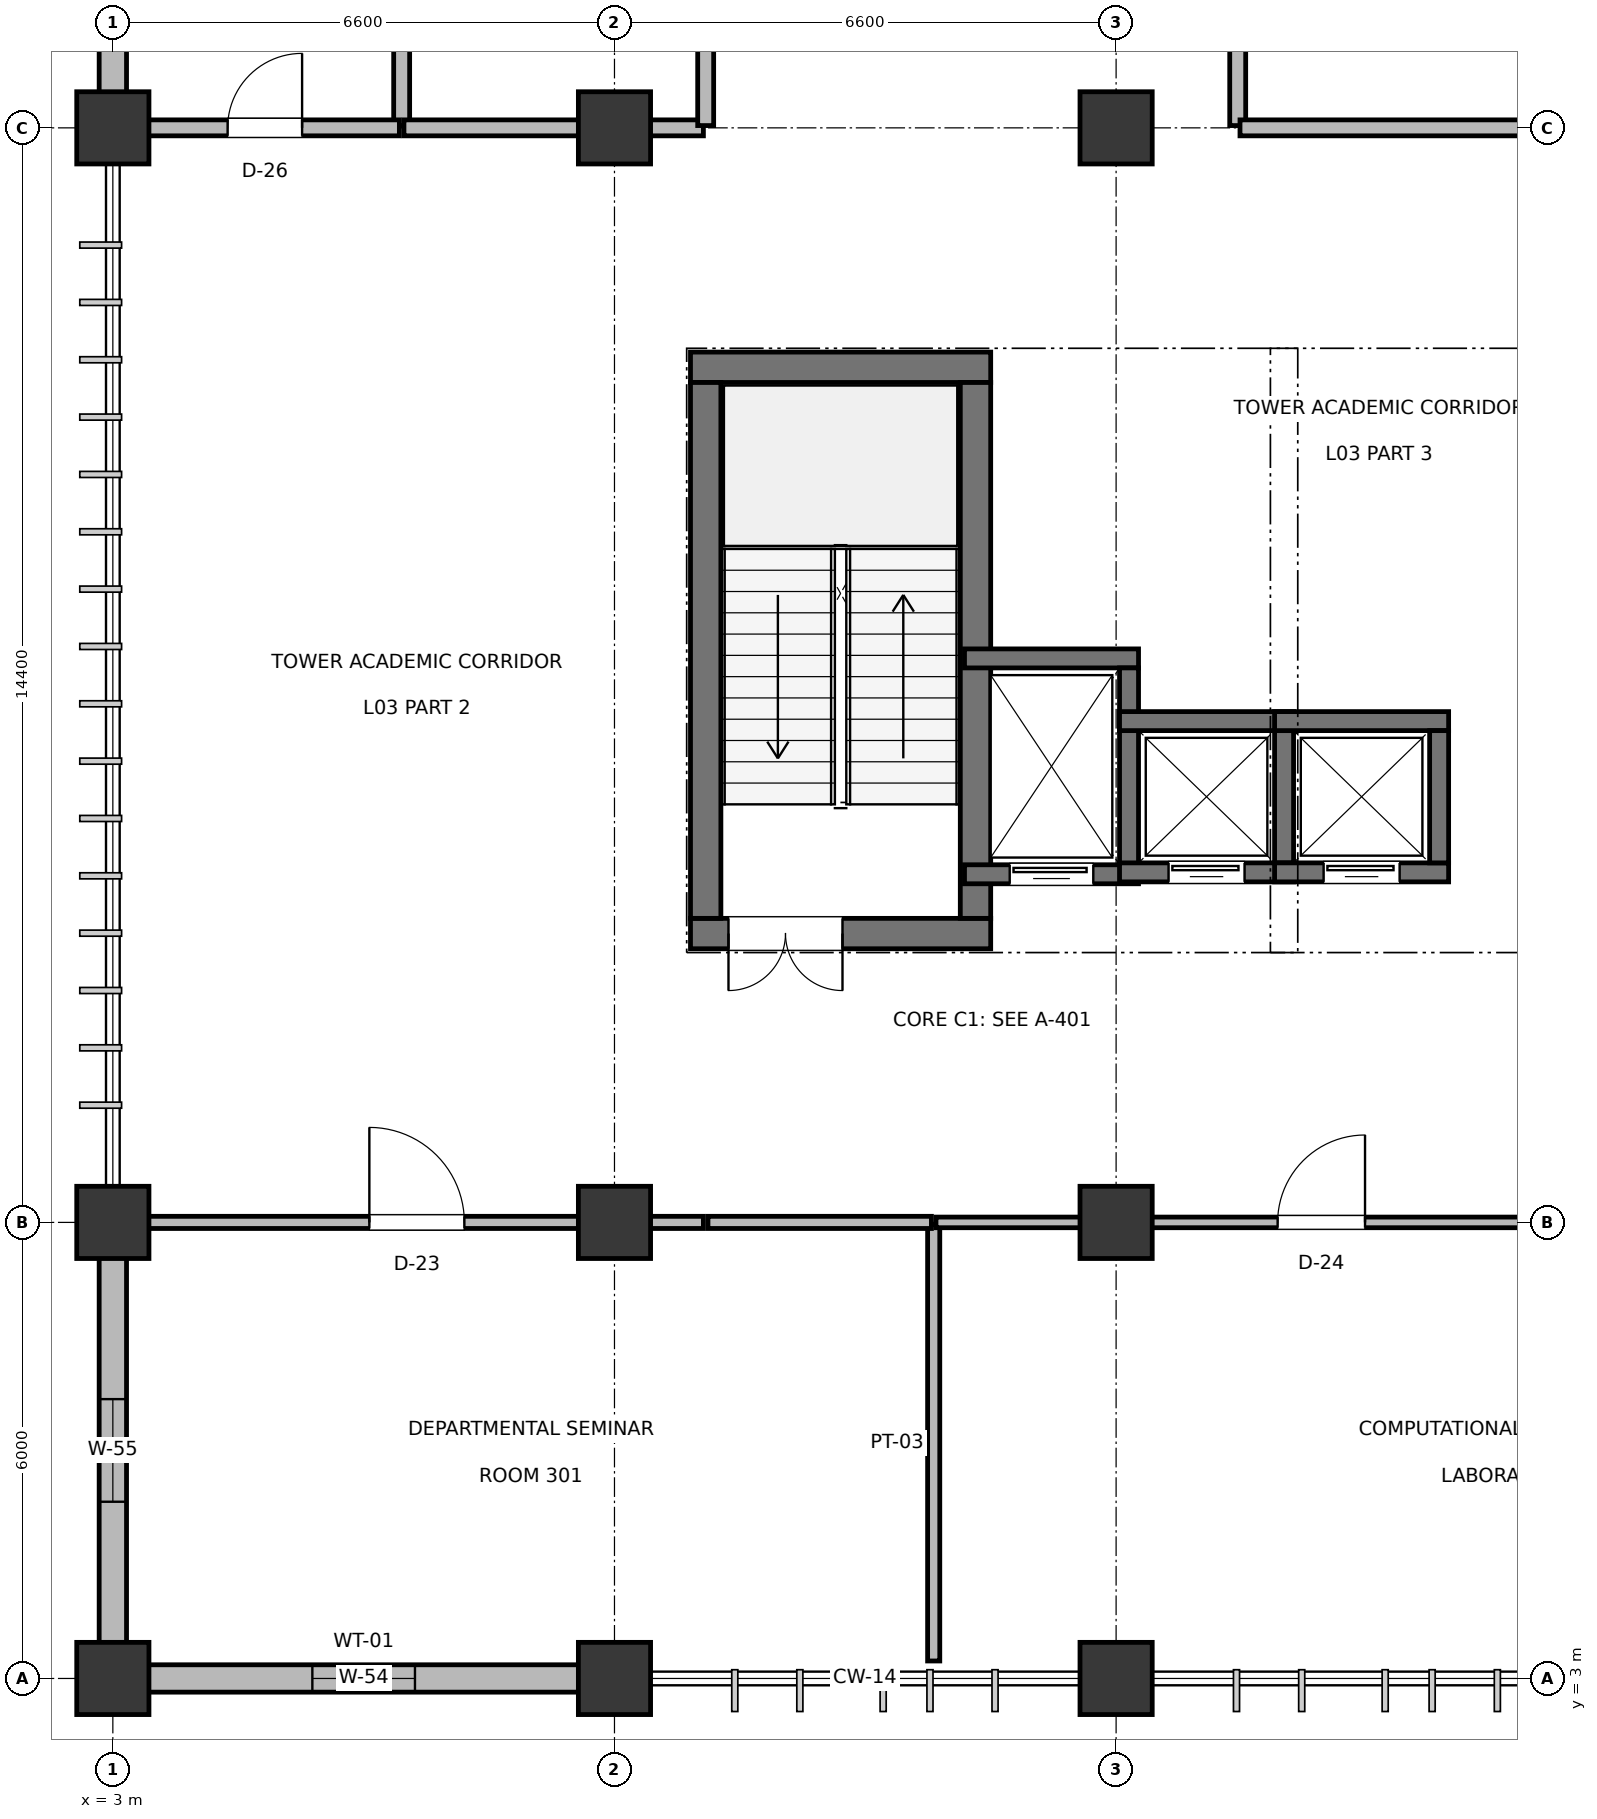
"""IFC4 building model, lengths in metres.
Left out: names, types, materials, properties, quantities, classifications, styles, units other than length and angle.
Written with IfcOpenShell. Run it as: python <this file> out.ifc"""

import sys

from ifc_helpers import new_model, si_unit, direction, frame, frame_2d, origin, origin_2d, place, context, subcontext, project, spatial, rectangle, extrude, element, fill, save


model = new_model("IFC4")
c1 = context("Model", 3, precision=1e-05, world=origin(), true_north=direction((0.0, 1.0)))
c2 = subcontext(c1, "Body", "Model", "MODEL_VIEW")
j1 = project(units=[si_unit("LENGTHUNIT", "METRE"), si_unit("PLANEANGLEUNIT", "RADIAN")], contexts=[c1])
p1 = place(None, origin())
s1 = spatial("IfcSite", under=j1, at=p1, CompositionType="ELEMENT")
p2 = place(p1, origin())
s2 = spatial("IfcBuilding", under=s1, at=p2, CompositionType="ELEMENT")
p3 = place(p2, frame((0.0, 0.0, 15.0)))
s3 = spatial("IfcBuildingStorey", under=s2, at=p3, CompositionType="ELEMENT", Elevation=15.0)
for number, where, z_axis, x_axis in (
    (1, (3.0, 3.0, 0.0), (0.0, 0.0, 1.0), (1.0, 0.0, 0.0)),
    (2, (3.0, 9.0, 0.0), (0.0, 0.0, 1.0), (1.0, 0.0, 0.0)),
    (3, (3.0, 23.4, 0.0), (0.0, 0.0, 1.0), (1.0, 0.0, 0.0)),
    (4, (9.6, 3.0, 0.0), (0.0, 0.0, 1.0), (1.0, 0.0, 0.0)),
    (5, (9.6, 9.0, 0.0), (0.0, 0.0, 1.0), (1.0, 0.0, 0.0)),
    (6, (9.6, 23.4, 0.0), (0.0, 0.0, 1.0), (1.0, 0.0, 0.0)),
    (7, (16.2, 3.0, 0.0), (0.0, 0.0, 1.0), (1.0, 0.0, 0.0)),
    (8, (16.2, 9.0, 0.0), (0.0, 0.0, 1.0), (1.0, 0.0, 0.0)),
    (9, (16.2, 23.4, 0.0), (0.0, 0.0, 1.0), (1.0, 0.0, 0.0)),
):
    element("IfcColumn", number, at=place(p3, frame(where, z_axis=z_axis, x_axis=x_axis)), inside=s3, PredefinedType="COLUMN", context=c2, shape_type="SweptSolid", body=[
        extrude(rectangle(XDim=0.95, YDim=0.95, at=origin_2d()), origin(), (0.0, 0.0, 1.0), 4.5),
    ])
p4 = place(p3, frame((3.465, 3.0, 0.0), z_axis=(0.0, 0.0, 1.0), x_axis=(1.0, 0.0, 0.0)))
e10 = element("IfcWall", 10, at=p4, inside=s3, PredefinedType="SOLIDWALL", context=c2, shape_type="SweptSolid", body=[
    extrude(rectangle(XDim=5.67, YDim=0.36, at=frame_2d((2.835, 0.0))), origin(), (0.0, 0.0, 1.0), 2.87),
])
p5 = place(p4, frame((2.16, 0.0, 0.9)))
e11 = element("IfcOpeningElement", 11, at=p5, cuts=e10, PredefinedType="OPENING", context=c2, shape_type="SweptSolid", body=[
    extrude(rectangle(XDim=1.35, YDim=1.35, at=frame_2d((0.675, 0.675))), frame((0.0, 0.19, 0.0), z_axis=(0.0, -1.0, 0.0), x_axis=(1.0, 0.0, 0.0)), (0.0, 0.0, 1.0), 0.38),
])
p6 = place(p3, frame((3.0, 3.465, 0.0), z_axis=(0.0, 0.0, 1.0), x_axis=(0.0, 1.0, 0.0)))
e12 = element("IfcWall", 12, at=p6, inside=s3, PredefinedType="SOLIDWALL", context=c2, shape_type="SweptSolid", body=[
    extrude(rectangle(XDim=5.07, YDim=0.36, at=frame_2d((2.535, 0.0))), origin(), (0.0, 0.0, 1.0), 3.575),
])
p7 = place(p6, frame((1.86, 0.0, 0.9)))
e13 = element("IfcOpeningElement", 13, at=p7, cuts=e12, PredefinedType="OPENING", context=c2, shape_type="SweptSolid", body=[
    extrude(rectangle(XDim=1.35, YDim=1.55, at=frame_2d((0.675, 0.775))), frame((0.0, 0.19, 0.0), z_axis=(0.0, -1.0, 0.0), x_axis=(1.0, 0.0, 0.0)), (0.0, 0.0, 1.0), 0.38),
])
p8 = place(p3, frame((3.0, 23.855, 0.0), z_axis=(0.0, 0.0, 1.0), x_axis=(0.0, 1.0, 0.0)))
e14 = element("IfcWall", 14, at=p8, inside=s3, PredefinedType="SOLIDWALL", context=c2, shape_type="SweptSolid", body=[
    extrude(rectangle(XDim=5.69, YDim=0.36, at=frame_2d((2.845, 0.0))), origin(), (0.0, 0.0, 1.0), 3.575),
])
p9 = place(p8, frame((2.17, 0.0, 0.9)))
e15 = element("IfcOpeningElement", 15, at=p9, cuts=e14, PredefinedType="OPENING", context=c2, shape_type="SweptSolid", body=[
    extrude(rectangle(XDim=1.35, YDim=1.75, at=frame_2d((0.675, 0.875))), frame((0.0, 0.19, 0.0), z_axis=(0.0, -1.0, 0.0), x_axis=(1.0, 0.0, 0.0)), (0.0, 0.0, 1.0), 0.38),
])
p10 = place(p3, frame((10.6, 12.8, 0.0), z_axis=(0.0, 0.0, 1.0), x_axis=(1.0, 0.0, 0.0)))
e16 = element("IfcWall", 16, at=p10, inside=s3, PredefinedType="SHEAR", context=c2, shape_type="SweptSolid", body=[
    extrude(rectangle(XDim=3.95, YDim=0.4, at=frame_2d((1.975, 0.0))), origin(), (0.0, 0.0, 1.0), 4.28),
])
p11 = place(p10, frame((0.5, 0.0, 0.0)))
e17 = element("IfcOpeningElement", 17, at=p11, cuts=e16, PredefinedType="OPENING", context=c2, shape_type="SweptSolid", body=[
    extrude(rectangle(XDim=1.5, YDim=2.2, at=frame_2d((0.75, 1.1))), frame((0.0, 0.21, 0.0), z_axis=(0.0, -1.0, 0.0), x_axis=(1.0, 0.0, 0.0)), (0.0, 0.0, 1.0), 0.42),
])
p12 = place(p3, frame((10.6, 20.25, 0.0), z_axis=(0.0, 0.0, 1.0), x_axis=(1.0, 0.0, 0.0)))
e18 = element("IfcWall", 18, at=p12, inside=s3, PredefinedType="SHEAR", context=c2, shape_type="SweptSolid", body=[
    extrude(rectangle(XDim=3.95, YDim=0.4, at=frame_2d((1.975, 0.0))), origin(), (0.0, 0.0, 1.0), 4.28),
])
for number, where, z_axis, x_axis in (
    (19, (10.8, 13.0, 0.0), (0.0, 0.0, 1.0), (0.0, 1.0, 0.0)),
    (20, (14.35, 13.0, 0.0), (0.0, 0.0, 1.0), (0.0, 1.0, 0.0)),
):
    element("IfcWall", number, at=place(p3, frame(where, z_axis=z_axis, x_axis=x_axis)), inside=s3, PredefinedType="SHEAR", context=c2, shape_type="SweptSolid", body=[
        extrude(rectangle(XDim=7.05, YDim=0.4, at=frame_2d((3.525, 0.0))), origin(), (0.0, 0.0, 1.0), 4.28),
    ])
p13 = place(p3, frame((14.205, 13.58, 0.0), z_axis=(0.0, 0.0, 1.0), x_axis=(1.0, 0.0, 0.0)))
e21 = element("IfcWall", 21, at=p13, inside=s3, PredefinedType="SHEAR", context=c2, shape_type="SweptSolid", body=[
    extrude(rectangle(XDim=2.29, YDim=0.25, at=frame_2d((1.145, 0.0))), origin(), (0.0, 0.0, 1.0), 4.26),
])
p14 = place(p13, frame((0.595, 0.0, 0.0)))
e22 = element("IfcOpeningElement", 22, at=p14, cuts=e21, PredefinedType="OPENING", context=c2, shape_type="SweptSolid", body=[
    extrude(rectangle(XDim=1.1, YDim=2.2, at=frame_2d((0.55, 1.1))), frame((0.0, 0.135, 0.0), z_axis=(0.0, -1.0, 0.0), x_axis=(1.0, 0.0, 0.0)), (0.0, 0.0, 1.0), 0.27),
])
p15 = place(p3, frame((14.205, 16.42, 0.0), z_axis=(0.0, 0.0, 1.0), x_axis=(1.0, 0.0, 0.0)))
e23 = element("IfcWall", 23, at=p15, inside=s3, PredefinedType="SHEAR", context=c2, shape_type="SweptSolid", body=[
    extrude(rectangle(XDim=2.29, YDim=0.25, at=frame_2d((1.145, 0.0))), origin(), (0.0, 0.0, 1.0), 4.26),
])
p16 = place(p3, frame((16.37, 13.705, 0.0), z_axis=(0.0, 0.0, 1.0), x_axis=(0.0, 1.0, 0.0)))
e24 = element("IfcWall", 24, at=p16, inside=s3, PredefinedType="SHEAR", context=c2, shape_type="SweptSolid", body=[
    extrude(rectangle(XDim=2.59, YDim=0.25, at=frame_2d((1.295, 0.0))), origin(), (0.0, 0.0, 1.0), 4.26),
])
p17 = place(p3, frame((16.245, 13.605, 0.0), z_axis=(0.0, 0.0, 1.0), x_axis=(1.0, 0.0, 0.0)))
e25 = element("IfcWall", 25, at=p17, inside=s3, PredefinedType="SHEAR", context=c2, shape_type="SweptSolid", body=[
    extrude(rectangle(XDim=2.29, YDim=0.25, at=frame_2d((1.145, 0.0))), origin(), (0.0, 0.0, 1.0), 4.26),
])
p18 = place(p17, frame((0.645, 0.0, 0.0)))
e26 = element("IfcOpeningElement", 26, at=p18, cuts=e25, PredefinedType="OPENING", context=c2, shape_type="SweptSolid", body=[
    extrude(rectangle(XDim=1.0, YDim=2.15, at=frame_2d((0.5, 1.075))), frame((0.0, 0.135, 0.0), z_axis=(0.0, -1.0, 0.0), x_axis=(1.0, 0.0, 0.0)), (0.0, 0.0, 1.0), 0.27),
])
p19 = place(p3, frame((16.245, 15.595, 0.0), z_axis=(0.0, 0.0, 1.0), x_axis=(1.0, 0.0, 0.0)))
e27 = element("IfcWall", 27, at=p19, inside=s3, PredefinedType="SHEAR", context=c2, shape_type="SweptSolid", body=[
    extrude(rectangle(XDim=2.29, YDim=0.25, at=frame_2d((1.145, 0.0))), origin(), (0.0, 0.0, 1.0), 4.26),
])
p20 = place(p3, frame((18.41, 13.73, 0.0), z_axis=(0.0, 0.0, 1.0), x_axis=(0.0, 1.0, 0.0)))
e28 = element("IfcWall", 28, at=p20, inside=s3, PredefinedType="SHEAR", context=c2, shape_type="SweptSolid", body=[
    extrude(rectangle(XDim=1.74, YDim=0.25, at=frame_2d((0.87, 0.0))), origin(), (0.0, 0.0, 1.0), 4.26),
])
p21 = place(p3, frame((18.285, 13.605, 0.0), z_axis=(0.0, 0.0, 1.0), x_axis=(1.0, 0.0, 0.0)))
e29 = element("IfcWall", 29, at=p21, inside=s3, PredefinedType="SHEAR", context=c2, shape_type="SweptSolid", body=[
    extrude(rectangle(XDim=2.29, YDim=0.25, at=frame_2d((1.145, 0.0))), origin(), (0.0, 0.0, 1.0), 4.26),
])
p22 = place(p21, frame((0.645, 0.0, 0.0)))
e30 = element("IfcOpeningElement", 30, at=p22, cuts=e29, PredefinedType="OPENING", context=c2, shape_type="SweptSolid", body=[
    extrude(rectangle(XDim=1.0, YDim=2.15, at=frame_2d((0.5, 1.075))), frame((0.0, 0.135, 0.0), z_axis=(0.0, -1.0, 0.0), x_axis=(1.0, 0.0, 0.0)), (0.0, 0.0, 1.0), 0.27),
])
p23 = place(p3, frame((18.285, 15.595, 0.0), z_axis=(0.0, 0.0, 1.0), x_axis=(1.0, 0.0, 0.0)))
e31 = element("IfcWall", 31, at=p23, inside=s3, PredefinedType="SHEAR", context=c2, shape_type="SweptSolid", body=[
    extrude(rectangle(XDim=2.29, YDim=0.25, at=frame_2d((1.145, 0.0))), origin(), (0.0, 0.0, 1.0), 4.26),
])
p24 = place(p3, frame((20.45, 13.73, 0.0), z_axis=(0.0, 0.0, 1.0), x_axis=(0.0, 1.0, 0.0)))
e32 = element("IfcWall", 32, at=p24, inside=s3, PredefinedType="SHEAR", context=c2, shape_type="SweptSolid", body=[
    extrude(rectangle(XDim=1.74, YDim=0.25, at=frame_2d((0.87, 0.0))), origin(), (0.0, 0.0, 1.0), 4.26),
])
p25 = place(p3, frame((13.8, 3.23, 0.0), z_axis=(0.0, 0.0, 1.0), x_axis=(0.0, 1.0, 0.0)))
e33 = element("IfcWall", 33, at=p25, inside=s3, PredefinedType="PARTITIONING", context=c2, shape_type="SweptSolid", body=[
    extrude(rectangle(XDim=5.74, YDim=0.16, at=frame_2d((2.87, 0.0))), origin(), (0.0, 0.0, 1.0), 3.535),
])
p26 = place(p3, frame((3.23, 9.0, 0.0), z_axis=(0.0, 0.0, 1.0), x_axis=(1.0, 0.0, 0.0)))
e34 = element("IfcWall", 34, at=p26, inside=s3, PredefinedType="PARTITIONING", context=c2, shape_type="SweptSolid", body=[
    extrude(rectangle(XDim=7.54, YDim=0.16, at=frame_2d((3.77, 0.0))), origin(), (0.0, 0.0, 1.0), 3.525),
])
p27 = place(p26, frame((3.145, 0.0, 0.0)))
e35 = element("IfcOpeningElement", 35, at=p27, cuts=e34, PredefinedType="OPENING", context=c2, shape_type="SweptSolid", body=[
    extrude(rectangle(XDim=1.25, YDim=2.2, at=frame_2d((0.625, 1.1))), frame((0.0, 0.09, 0.0), z_axis=(0.0, -1.0, 0.0), x_axis=(1.0, 0.0, 0.0)), (0.0, 0.0, 1.0), 0.18),
])
p28 = place(p3, frame((10.83, 9.0, 0.0), z_axis=(0.0, 0.0, 1.0), x_axis=(1.0, 0.0, 0.0)))
e36 = element("IfcWall", 36, at=p28, inside=s3, PredefinedType="PARTITIONING", context=c2, shape_type="SweptSolid", body=[
    extrude(rectangle(XDim=2.94, YDim=0.16, at=frame_2d((1.47, 0.0))), origin(), (0.0, 0.0, 1.0), 3.535),
])
p29 = place(p3, frame((13.83, 9.0, 0.0), z_axis=(0.0, 0.0, 1.0), x_axis=(1.0, 0.0, 0.0)))
e37 = element("IfcWall", 37, at=p29, inside=s3, PredefinedType="PARTITIONING", context=c2, shape_type="SweptSolid", body=[
    extrude(rectangle(XDim=10.14, YDim=0.14, at=frame_2d((5.07, 0.0))), origin(), (0.0, 0.0, 1.0), 3.495),
])
p30 = place(p29, frame((4.495, 0.0, 0.0)))
e38 = element("IfcOpeningElement", 38, at=p30, cuts=e37, PredefinedType="OPENING", context=c2, shape_type="SweptSolid", body=[
    extrude(rectangle(XDim=1.15, YDim=2.15, at=frame_2d((0.575, 1.075))), frame((0.0, 0.08, 0.0), z_axis=(0.0, -1.0, 0.0), x_axis=(1.0, 0.0, 0.0)), (0.0, 0.0, 1.0), 0.16),
])
p31 = place(p3, frame((6.8, 23.43, 0.0), z_axis=(0.0, 0.0, 1.0), x_axis=(0.0, 1.0, 0.0)))
e39 = element("IfcWall", 39, at=p31, inside=s3, PredefinedType="PLUMBINGWALL", context=c2, shape_type="SweptSolid", body=[
    extrude(rectangle(XDim=6.54, YDim=0.21, at=frame_2d((3.27, 0.0))), origin(), (0.0, 0.0, 1.0), 3.425),
])
p32 = place(p3, frame((3.23, 23.4, 0.0), z_axis=(0.0, 0.0, 1.0), x_axis=(1.0, 0.0, 0.0)))
e40 = element("IfcWall", 40, at=p32, inside=s3, PredefinedType="PLUMBINGWALL", context=c2, shape_type="SweptSolid", body=[
    extrude(rectangle(XDim=3.54, YDim=0.21, at=frame_2d((1.77, 0.0))), origin(), (0.0, 0.0, 1.0), 3.525),
])
p33 = place(p32, frame((1.28, 0.0, 0.0)))
e41 = element("IfcOpeningElement", 41, at=p33, cuts=e40, PredefinedType="OPENING", context=c2, shape_type="SweptSolid", body=[
    extrude(rectangle(XDim=0.98, YDim=2.1, at=frame_2d((0.49, 1.05))), frame((0.0, 0.115, 0.0), z_axis=(0.0, -1.0, 0.0), x_axis=(1.0, 0.0, 0.0)), (0.0, 0.0, 1.0), 0.23),
])
p34 = place(p3, frame((6.83, 23.4, 0.0), z_axis=(0.0, 0.0, 1.0), x_axis=(1.0, 0.0, 0.0)))
e42 = element("IfcWall", 42, at=p34, inside=s3, PredefinedType="PLUMBINGWALL", context=c2, shape_type="SweptSolid", body=[
    extrude(rectangle(XDim=3.94, YDim=0.21, at=frame_2d((1.97, 0.0))), origin(), (0.0, 0.0, 1.0), 3.355),
])
p35 = place(p3, frame((10.8, 23.43, 0.0), z_axis=(0.0, 0.0, 1.0), x_axis=(0.0, 1.0, 0.0)))
e43 = element("IfcWall", 43, at=p35, inside=s3, PredefinedType="PLUMBINGWALL", context=c2, shape_type="SweptSolid", body=[
    extrude(rectangle(XDim=6.54, YDim=0.21, at=frame_2d((3.27, 0.0))), origin(), (0.0, 0.0, 1.0), 3.355),
])
p36 = place(p35, frame((2.81, 0.0, 0.0)))
e44 = element("IfcOpeningElement", 44, at=p36, cuts=e43, PredefinedType="OPENING", context=c2, shape_type="SweptSolid", body=[
    extrude(rectangle(XDim=0.92, YDim=2.1, at=frame_2d((0.46, 1.05))), frame((0.0, 0.115, 0.0), z_axis=(0.0, -1.0, 0.0), x_axis=(1.0, 0.0, 0.0)), (0.0, 0.0, 1.0), 0.23),
])
p37 = place(p3, frame((17.8, 23.43, 0.0), z_axis=(0.0, 0.0, 1.0), x_axis=(0.0, 1.0, 0.0)))
e45 = element("IfcWall", 45, at=p37, inside=s3, PredefinedType="PLUMBINGWALL", context=c2, shape_type="SweptSolid", body=[
    extrude(rectangle(XDim=6.54, YDim=0.21, at=frame_2d((3.27, 0.0))), origin(), (0.0, 0.0, 1.0), 3.425),
])
p38 = place(p37, frame((2.81, 0.0, 0.0)))
e46 = element("IfcOpeningElement", 46, at=p38, cuts=e45, PredefinedType="OPENING", context=c2, shape_type="SweptSolid", body=[
    extrude(rectangle(XDim=0.92, YDim=2.1, at=frame_2d((0.46, 1.05))), frame((0.0, 0.115, 0.0), z_axis=(0.0, -1.0, 0.0), x_axis=(1.0, 0.0, 0.0)), (0.0, 0.0, 1.0), 0.23),
])
p39 = place(p3, frame((17.83, 23.4, 0.0), z_axis=(0.0, 0.0, 1.0), x_axis=(1.0, 0.0, 0.0)))
e47 = element("IfcWall", 47, at=p39, inside=s3, PredefinedType="PLUMBINGWALL", context=c2, shape_type="SweptSolid", body=[
    extrude(rectangle(XDim=6.14, YDim=0.21, at=frame_2d((3.07, 0.0))), origin(), (0.0, 0.0, 1.0), 3.525),
])
p40 = place(p5, frame((1.35, 0.0, 0.0), z_axis=(0.0, 0.0, 1.0), x_axis=(-1.0, 0.0, 0.0)))
e48 = element("IfcWindow", 48, at=p40, inside=s3, PartitioningType="DOUBLE_PANEL_VERTICAL", PredefinedType="WINDOW", context=c2, shape_type="SweptSolid", body=[
    extrude(rectangle(XDim=1.35, YDim=1.35, at=frame_2d((0.675, 0.675))), frame((0.0, 0.03, 0.0), z_axis=(0.0, -1.0, 0.0), x_axis=(1.0, 0.0, 0.0)), (0.0, 0.0, 1.0), 0.06),
])
fill(e11, e48)
p41 = place(p7, origin())
e49 = element("IfcWindow", 49, at=p41, inside=s3, PartitioningType="DOUBLE_PANEL_VERTICAL", PredefinedType="WINDOW", context=c2, shape_type="SweptSolid", body=[
    extrude(rectangle(XDim=1.35, YDim=1.55, at=frame_2d((0.675, 0.775))), frame((0.0, 0.03, 0.0), z_axis=(0.0, -1.0, 0.0), x_axis=(1.0, 0.0, 0.0)), (0.0, 0.0, 1.0), 0.06),
])
fill(e13, e49)
p42 = place(p11, frame((1.5, 0.0, 0.0), z_axis=(0.0, 0.0, 1.0), x_axis=(-1.0, 0.0, 0.0)))
e50 = element("IfcDoor", 50, at=p42, inside=s3, OperationType="DOUBLE_DOOR_SINGLE_SWING", PredefinedType="DOOR", context=c2, shape_type="SweptSolid", body=[
    extrude(rectangle(XDim=1.5, YDim=2.2, at=frame_2d((0.75, 1.1))), frame((0.0, 0.025, 0.0), z_axis=(0.0, -1.0, 0.0), x_axis=(1.0, 0.0, 0.0)), (0.0, 0.0, 1.0), 0.05),
])
fill(e17, e50)
p43 = place(p14, frame((1.1, 0.0, 0.0), z_axis=(0.0, 0.0, 1.0), x_axis=(-1.0, 0.0, 0.0)))
e51 = element("IfcDoor", 51, at=p43, inside=s3, OperationType="SLIDING_TO_LEFT", PredefinedType="DOOR", context=c2, shape_type="SweptSolid", body=[
    extrude(rectangle(XDim=1.1, YDim=2.2, at=frame_2d((0.55, 1.1))), frame((0.0, 0.025, 0.0), z_axis=(0.0, -1.0, 0.0), x_axis=(1.0, 0.0, 0.0)), (0.0, 0.0, 1.0), 0.05),
])
fill(e22, e51)
p44 = place(p18, frame((1.0, 0.0, 0.0), z_axis=(0.0, 0.0, 1.0), x_axis=(-1.0, 0.0, 0.0)))
e52 = element("IfcDoor", 52, at=p44, inside=s3, OperationType="SLIDING_TO_LEFT", PredefinedType="DOOR", context=c2, shape_type="SweptSolid", body=[
    extrude(rectangle(XDim=1.0, YDim=2.15, at=frame_2d((0.5, 1.075))), frame((0.0, 0.025, 0.0), z_axis=(0.0, -1.0, 0.0), x_axis=(1.0, 0.0, 0.0)), (0.0, 0.0, 1.0), 0.05),
])
fill(e26, e52)
p45 = place(p22, frame((1.0, 0.0, 0.0), z_axis=(0.0, 0.0, 1.0), x_axis=(-1.0, 0.0, 0.0)))
e53 = element("IfcDoor", 53, at=p45, inside=s3, OperationType="SLIDING_TO_LEFT", PredefinedType="DOOR", context=c2, shape_type="SweptSolid", body=[
    extrude(rectangle(XDim=1.0, YDim=2.15, at=frame_2d((0.5, 1.075))), frame((0.0, 0.025, 0.0), z_axis=(0.0, -1.0, 0.0), x_axis=(1.0, 0.0, 0.0)), (0.0, 0.0, 1.0), 0.05),
])
fill(e30, e53)
p46 = place(p27, origin())
e54 = element("IfcDoor", 54, at=p46, inside=s3, OperationType="SINGLE_SWING_LEFT", PredefinedType="DOOR", context=c2, shape_type="SweptSolid", body=[
    extrude(rectangle(XDim=1.25, YDim=2.2, at=frame_2d((0.625, 1.1))), frame((0.0, 0.025, 0.0), z_axis=(0.0, -1.0, 0.0), x_axis=(1.0, 0.0, 0.0)), (0.0, 0.0, 1.0), 0.05),
])
fill(e35, e54)
p47 = place(p30, origin())
e55 = element("IfcDoor", 55, at=p47, inside=s3, OperationType="SINGLE_SWING_RIGHT", PredefinedType="DOOR", context=c2, shape_type="SweptSolid", body=[
    extrude(rectangle(XDim=1.15, YDim=2.15, at=frame_2d((0.575, 1.075))), frame((0.0, 0.025, 0.0), z_axis=(0.0, -1.0, 0.0), x_axis=(1.0, 0.0, 0.0)), (0.0, 0.0, 1.0), 0.05),
])
fill(e38, e55)
p48 = place(p33, origin())
e56 = element("IfcDoor", 56, at=p48, inside=s3, OperationType="SINGLE_SWING_RIGHT", PredefinedType="DOOR", context=c2, shape_type="SweptSolid", body=[
    extrude(rectangle(XDim=0.98, YDim=2.1, at=frame_2d((0.49, 1.05))), frame((0.0, 0.025, 0.0), z_axis=(0.0, -1.0, 0.0), x_axis=(1.0, 0.0, 0.0)), (0.0, 0.0, 1.0), 0.05),
])
fill(e41, e56)
save(model, sys.argv[1])
